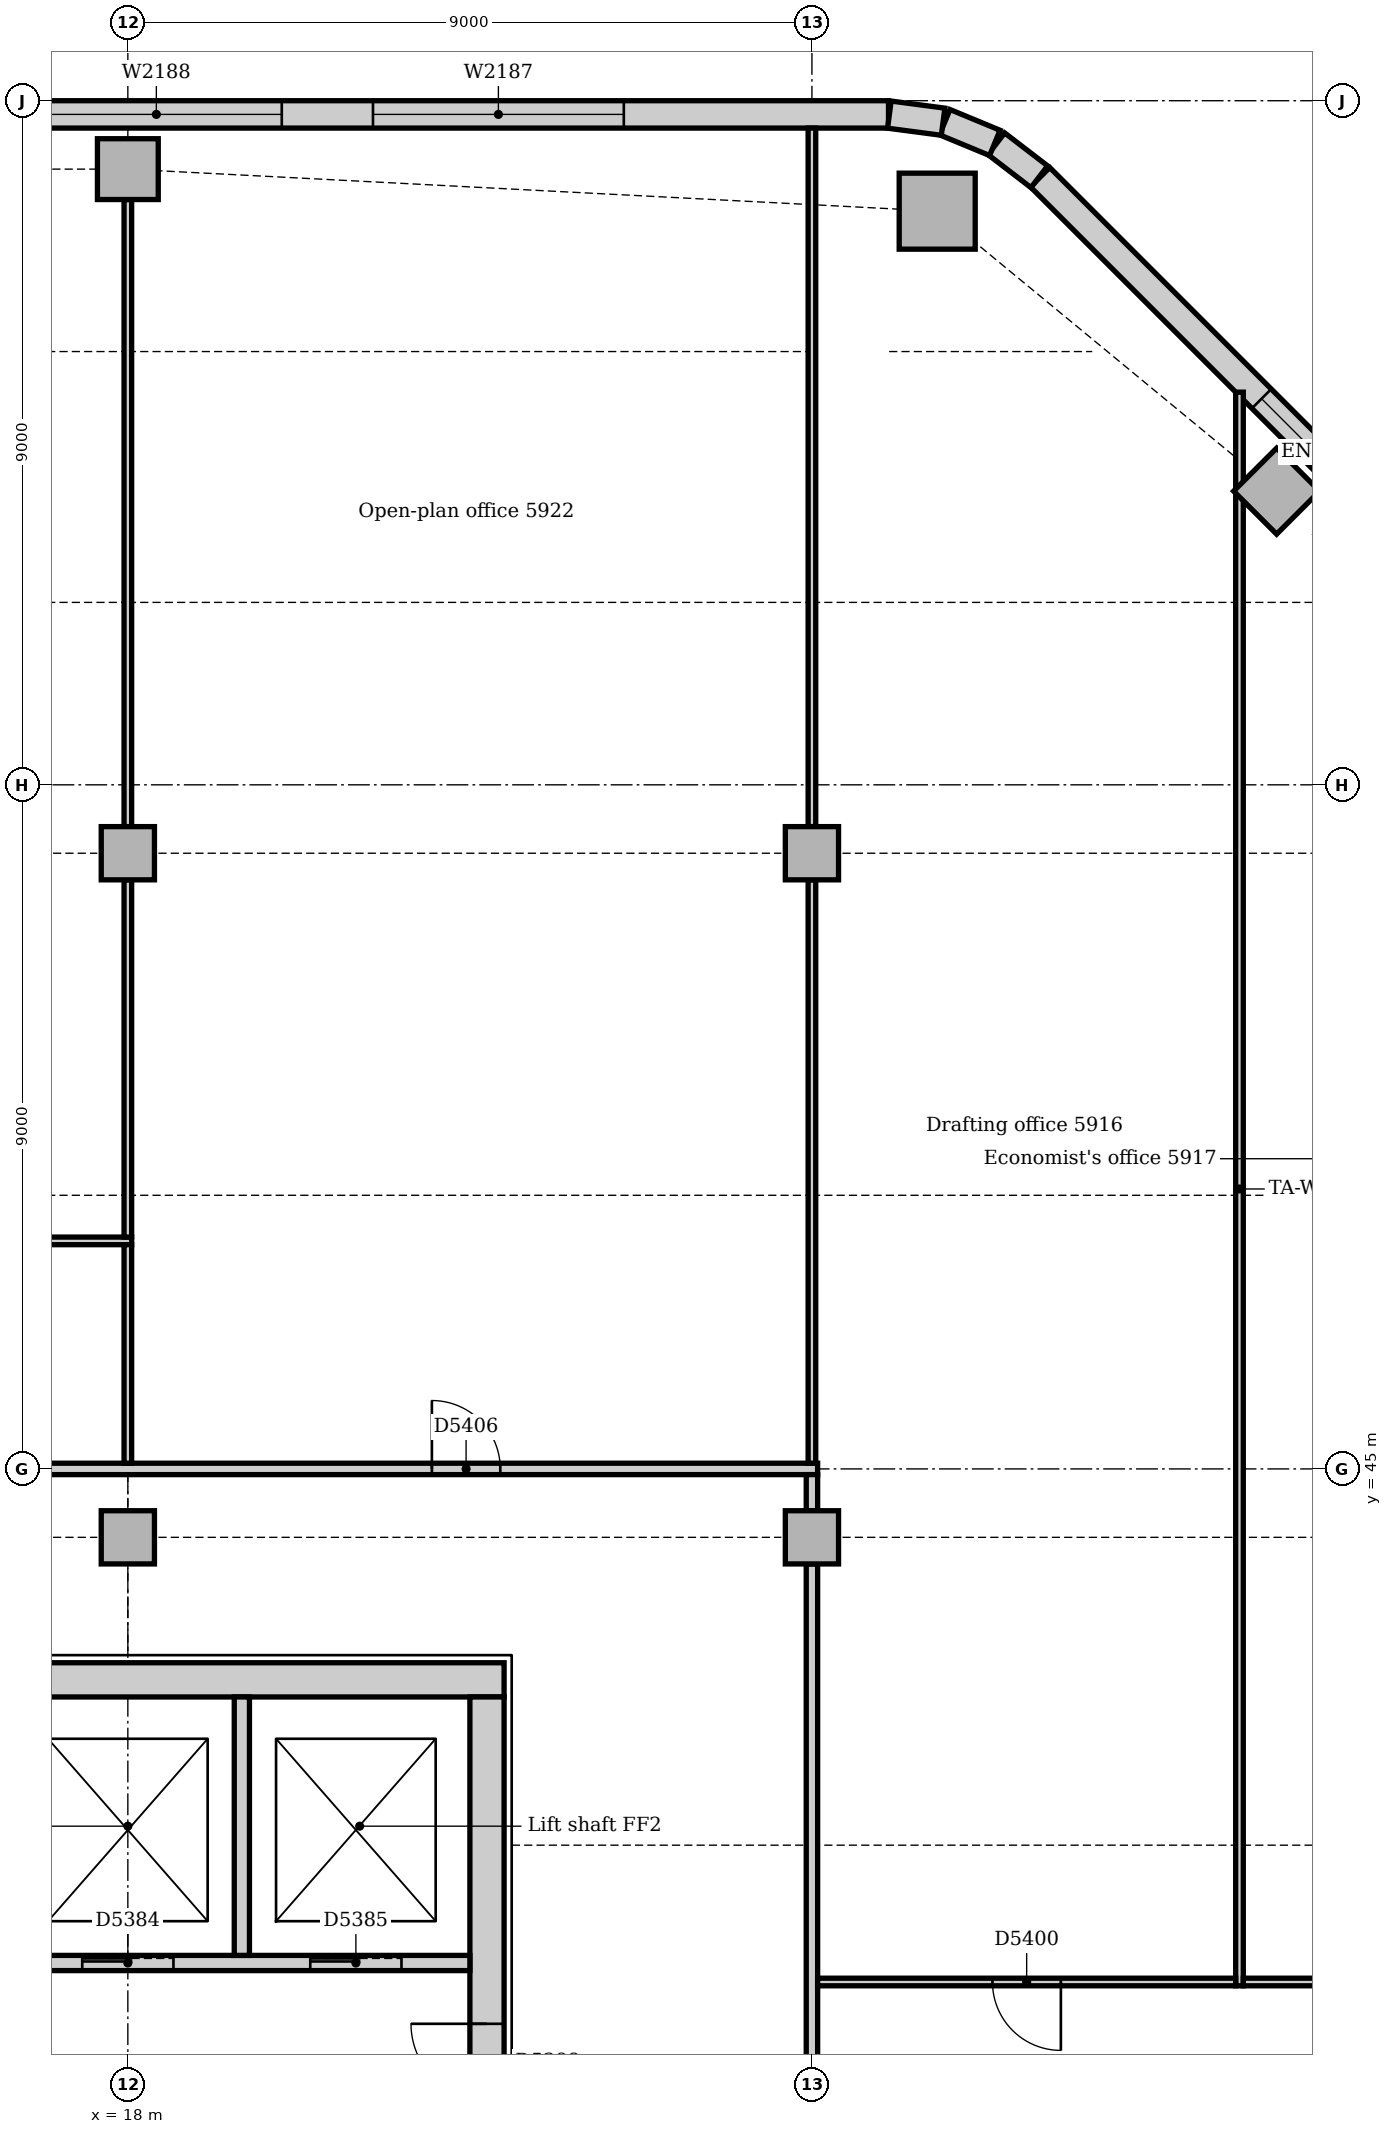
"""IFC4 building model, lengths in metres.
Left out: names, types, materials, properties, quantities, classifications, styles, units other than length and angle.
Written with IfcOpenShell. Run it as: python <this file> out.ifc"""

import sys

from ifc_helpers import new_model, si_unit, direction, frame, frame_2d, origin, origin_2d, place, context, subcontext, project, spatial, rectangle, extrude, element, fill, save


model = new_model("IFC4")
c1 = context("Model", 3, precision=1e-05, world=origin(), true_north=direction((0.0, 1.0)))
c2 = subcontext(c1, "Body", "Model", "MODEL_VIEW")
j1 = project(units=[si_unit("LENGTHUNIT", "METRE"), si_unit("PLANEANGLEUNIT", "RADIAN")], contexts=[c1])
p1 = place(None, origin())
s1 = spatial("IfcSite", under=j1, at=p1, CompositionType="ELEMENT")
p2 = place(p1, origin())
s2 = spatial("IfcBuilding", under=s1, at=p2, CompositionType="ELEMENT")
p3 = place(p2, frame((0.0, 0.0, 247.0)))
s3 = spatial("IfcBuildingStorey", under=s2, at=p3, CompositionType="ELEMENT", Elevation=247.0)
p4 = place(p3, frame((22.95, 42.225, 0.0), z_axis=(0.0, 0.0, 1.0), x_axis=(-1.0, 0.0, 0.0)))
e1 = element("IfcWall", 1, at=p4, inside=s3, PredefinedType="SOLIDWALL", context=c2, shape_type="SweptSolid", body=[
    extrude(rectangle(XDim=18.9, YDim=0.45, at=frame_2d((9.45, 0.0))), origin(), (0.0, 0.0, 1.0), 4.0),
])
p5 = place(p3, frame((22.725, 31.5, 0.0), z_axis=(0.0, 0.0, 1.0), x_axis=(0.0, 1.0, 0.0)))
e2 = element("IfcWall", 2, at=p5, inside=s3, PredefinedType="SOLIDWALL", context=c2, shape_type="SweptSolid", body=[
    extrude(rectangle(XDim=10.5, YDim=0.45, at=frame_2d((5.25, 0.0))), origin(), (0.0, 0.0, 1.0), 4.0),
])
p6 = place(p5, frame((3.15, 0.0, 0.0)))
e3 = element("IfcOpeningElement", 3, at=p6, cuts=e2, PredefinedType="OPENING", context=c2, shape_type="SweptSolid", body=[
    extrude(rectangle(XDim=1.0, YDim=2.1, at=frame_2d((0.5, 1.05))), frame((0.0, 0.235, 0.0), z_axis=(0.0, -1.0, 0.0), x_axis=(1.0, 0.0, 0.0)), (0.0, 0.0, 1.0), 0.47),
])
p7 = place(p5, frame((5.2, 0.0, 0.0)))
e4 = element("IfcOpeningElement", 4, at=p7, cuts=e2, PredefinedType="OPENING", context=c2, shape_type="SweptSolid", body=[
    extrude(rectangle(XDim=1.0, YDim=2.1, at=frame_2d((0.5, 1.05))), frame((0.0, 0.235, 0.0), z_axis=(0.0, -1.0, 0.0), x_axis=(1.0, 0.0, 0.0)), (0.0, 0.0, 1.0), 0.47),
])
p8 = place(p3, frame((28.648, 61.547, -0.15), z_axis=(0.0, 0.0, 1.0), x_axis=(1.0, 0.0, 0.0)))
e5 = element("IfcColumn", 5, at=p8, inside=s3, PredefinedType="COLUMN", context=c2, shape_type="SweptSolid", body=[
    extrude(rectangle(XDim=1.0, YDim=1.0, at=origin_2d()), origin(), (0.0, 0.0, 1.0), 4.0),
])
for number, where, z_axis, x_axis in (
    (6, (33.114, 57.864, -0.15), (0.0, 0.0, 1.0), (0.707, 0.707, 0.0)),
    (7, (18.0, 62.1, -0.15), (0.0, 0.0, 1.0), (1.0, 0.0, 0.0)),
):
    element("IfcColumn", number, at=place(p3, frame(where, z_axis=z_axis, x_axis=x_axis)), inside=s3, PredefinedType="COLUMN", context=c2, shape_type="SweptSolid", body=[
        extrude(rectangle(XDim=0.8, YDim=0.8, at=origin_2d()), origin(), (0.0, 0.0, 1.0), 4.0),
    ])
for number, where, z_axis, x_axis in (
    (8, (18.0, 44.1, 0.0), (0.0, 0.0, 1.0), (1.0, 0.0, 0.0)),
    (9, (18.0, 53.1, 0.0), (0.0, 0.0, 1.0), (1.0, 0.0, 0.0)),
    (10, (27.0, 44.1, 0.0), (0.0, 0.0, 1.0), (1.0, 0.0, 0.0)),
    (11, (27.0, 53.1, 0.0), (0.0, 0.0, 1.0), (1.0, 0.0, 0.0)),
):
    element("IfcColumn", number, at=place(p3, frame(where, z_axis=z_axis, x_axis=x_axis)), inside=s3, PredefinedType="COLUMN", context=c2, shape_type="SweptSolid", body=[
        extrude(rectangle(XDim=0.7, YDim=0.7, at=origin_2d()), origin(), (0.0, 0.0, 1.0), 3.85),
    ])
p9 = place(p3, frame((37.244, 54.751, 0.0), z_axis=(0.0, 0.0, 1.0), x_axis=(-0.707106781187, 0.707106781187, 0.0)))
e12 = element("IfcWall", 12, at=p9, inside=s3, PredefinedType="STANDARD", context=c2, shape_type="SweptSolid", body=[
    extrude(rectangle(XDim=10.243, YDim=0.36, at=frame_2d((5.121, 0.0))), origin(), (0.0, 0.0, 1.0), 3.85),
])
p10 = place(p9, frame((2.821, 0.0, 0.9)))
e13 = element("IfcOpeningElement", 13, at=p10, cuts=e12, PredefinedType="OPENING", context=c2, shape_type="SweptSolid", body=[
    extrude(rectangle(XDim=3.3, YDim=1.6, at=frame_2d((1.65, 0.8))), frame((0.0, 0.19, 0.0), z_axis=(0.0, -1.0, 0.0), x_axis=(1.0, 0.0, 0.0)), (0.0, 0.0, 1.0), 0.38),
])
p11 = place(p3, frame((28.007, 62.82, 0.0), z_axis=(0.0, 0.0, 1.0), x_axis=(-1.0, 0.0, 0.0)))
e14 = element("IfcWall", 14, at=p11, inside=s3, PredefinedType="STANDARD", context=c2, shape_type="SweptSolid", body=[
    extrude(rectangle(XDim=23.765, YDim=0.36, at=frame_2d((11.882, 0.0))), origin(), (0.0, 0.0, 1.0), 3.85),
])
p12 = place(p11, frame((3.482, 0.0, 0.9)))
e15 = element("IfcOpeningElement", 15, at=p12, cuts=e14, PredefinedType="OPENING", context=c2, shape_type="SweptSolid", body=[
    extrude(rectangle(XDim=3.3, YDim=1.6, at=frame_2d((1.65, 0.8))), frame((0.0, 0.19, 0.0), z_axis=(0.0, -1.0, 0.0), x_axis=(1.0, 0.0, 0.0)), (0.0, 0.0, 1.0), 0.38),
])
p13 = place(p11, frame((7.982, 0.0, 0.9)))
e16 = element("IfcOpeningElement", 16, at=p13, cuts=e14, PredefinedType="OPENING", context=c2, shape_type="SweptSolid", body=[
    extrude(rectangle(XDim=3.3, YDim=1.6, at=frame_2d((1.65, 0.8))), frame((0.0, 0.19, 0.0), z_axis=(0.0, -1.0, 0.0), x_axis=(1.0, 0.0, 0.0)), (0.0, 0.0, 1.0), 0.38),
])
p14 = place(p11, frame((12.482, 0.0, 0.9)))
e17 = element("IfcOpeningElement", 17, at=p14, cuts=e14, PredefinedType="OPENING", context=c2, shape_type="SweptSolid", body=[
    extrude(rectangle(XDim=3.3, YDim=1.6, at=frame_2d((1.65, 0.8))), frame((0.0, 0.19, 0.0), z_axis=(0.0, -1.0, 0.0), x_axis=(1.0, 0.0, 0.0)), (0.0, 0.0, 1.0), 0.38),
])
p15 = place(p11, frame((16.982, 0.0, 0.9)))
e18 = element("IfcOpeningElement", 18, at=p15, cuts=e14, PredefinedType="OPENING", context=c2, shape_type="SweptSolid", body=[
    extrude(rectangle(XDim=3.3, YDim=1.6, at=frame_2d((1.65, 0.8))), frame((0.0, 0.19, 0.0), z_axis=(0.0, -1.0, 0.0), x_axis=(1.0, 0.0, 0.0)), (0.0, 0.0, 1.0), 0.38),
])
p16 = place(p3, frame((29.991, 62.0, 0.0), z_axis=(0.0, 0.0, 1.0), x_axis=(-0.793321924995, 0.608802368033, 0.0)))
e19 = element("IfcWall", 19, at=p16, inside=s3, PredefinedType="STANDARD", context=c2, shape_type="SweptSolid", body=[
    extrude(rectangle(XDim=0.713, YDim=0.36, at=frame_2d((0.357, 0.0))), origin(), (0.0, 0.0, 1.0), 3.85),
])
for number, where, z_axis, x_axis in (
    (20, (29.406, 62.445, 0.0), (0.0, 0.0, 1.0), (-0.924, 0.383, 0.0)),
    (21, (28.726, 62.724, 0.0), (0.0, 0.0, 1.0), (-0.991, 0.131, 0.0)),
):
    element("IfcWall", number, at=place(p3, frame(where, z_axis=z_axis, x_axis=x_axis)), inside=s3, PredefinedType="STANDARD", context=c2, shape_type="SweptSolid", body=[
        extrude(rectangle(XDim=0.713, YDim=0.36, at=frame_2d((0.356, 0.0))), origin(), (0.0, 0.0, 1.0), 3.85),
    ])
p17 = place(p3, frame((16.4, 38.5, 0.0), z_axis=(0.0, 0.0, 1.0), x_axis=(1.0, 0.0, 0.0)))
e22 = element("IfcWall", 22, at=p17, inside=s3, PredefinedType="PARTITIONING", context=c2, shape_type="SweptSolid", body=[
    extrude(rectangle(XDim=6.1, YDim=0.2, at=frame_2d((3.05, 0.0))), origin(), (0.0, 0.0, 1.0), 3.85),
])
p18 = place(p17, frame((1.0, 0.0, 0.0)))
e23 = element("IfcOpeningElement", 23, at=p18, cuts=e22, PredefinedType="OPENING", context=c2, shape_type="SweptSolid", body=[
    extrude(rectangle(XDim=1.2, YDim=2.1, at=frame_2d((0.6, 1.05))), frame((0.0, 0.11, 0.0), z_axis=(0.0, -1.0, 0.0), x_axis=(1.0, 0.0, 0.0)), (0.0, 0.0, 1.0), 0.22),
])
p19 = place(p17, frame((4.0, 0.0, 0.0)))
e24 = element("IfcOpeningElement", 24, at=p19, cuts=e22, PredefinedType="OPENING", context=c2, shape_type="SweptSolid", body=[
    extrude(rectangle(XDim=1.2, YDim=2.1, at=frame_2d((0.6, 1.05))), frame((0.0, 0.11, 0.0), z_axis=(0.0, -1.0, 0.0), x_axis=(1.0, 0.0, 0.0)), (0.0, 0.0, 1.0), 0.22),
])
p20 = place(p3, frame((19.5, 38.6, 0.0), z_axis=(0.0, 0.0, 1.0), x_axis=(0.0, 1.0, 0.0)))
e25 = element("IfcWall", 25, at=p20, inside=s3, PredefinedType="PARTITIONING", context=c2, shape_type="SweptSolid", body=[
    extrude(rectangle(XDim=3.4, YDim=0.2, at=frame_2d((1.7, 0.0))), origin(), (0.0, 0.0, 1.0), 3.85),
])
p21 = place(p3, frame((0.36, 45.0, 0.0), z_axis=(0.0, 0.0, 1.0), x_axis=(1.0, 0.0, 0.0)))
e26 = element("IfcWall", 26, at=p21, inside=s3, PredefinedType="PARTITIONING", context=c2, shape_type="SweptSolid", body=[
    extrude(rectangle(XDim=26.715, YDim=0.15, at=frame_2d((13.357, 0.0))), origin(), (0.0, 0.0, 1.0), 3.85),
])
p22 = place(p21, frame((9.0, 0.0, 0.0)))
e27 = element("IfcOpeningElement", 27, at=p22, cuts=e26, PredefinedType="OPENING", context=c2, shape_type="SweptSolid", body=[
    extrude(rectangle(XDim=1.0, YDim=2.1, at=frame_2d((0.5, 1.05))), frame((0.0, 0.085, 0.0), z_axis=(0.0, -1.0, 0.0), x_axis=(1.0, 0.0, 0.0)), (0.0, 0.0, 1.0), 0.17),
])
p23 = place(p21, frame((21.64, 0.0, 0.0)))
e28 = element("IfcOpeningElement", 28, at=p23, cuts=e26, PredefinedType="OPENING", context=c2, shape_type="SweptSolid", body=[
    extrude(rectangle(XDim=0.9, YDim=2.1, at=frame_2d((0.45, 1.05))), frame((0.0, 0.085, 0.0), z_axis=(0.0, -1.0, 0.0), x_axis=(1.0, 0.0, 0.0)), (0.0, 0.0, 1.0), 0.17),
])
p24 = place(p3, frame((27.0, 36.35, 0.0), z_axis=(0.0, 0.0, 1.0), x_axis=(0.0, 1.0, 0.0)))
e29 = element("IfcWall", 29, at=p24, inside=s3, PredefinedType="PARTITIONING", context=c2, shape_type="SweptSolid", body=[
    extrude(rectangle(XDim=7.4, YDim=0.15, at=frame_2d((3.7, 0.0))), origin(), (0.0, 0.0, 1.0), 3.4),
])
p25 = place(p3, frame((27.0, 44.45, 0.0), z_axis=(0.0, 0.0, 1.0), x_axis=(0.0, 1.0, 0.0)))
e30 = element("IfcWall", 30, at=p25, inside=s3, PredefinedType="PARTITIONING", context=c2, shape_type="SweptSolid", body=[
    extrude(rectangle(XDim=0.475, YDim=0.15, at=frame_2d((0.237, 0.0))), origin(), (0.0, 0.0, 1.0), 3.85),
])
p26 = place(p3, frame((32.625, 38.2, 0.0), z_axis=(0.0, 0.0, 1.0), x_axis=(0.0, 1.0, 0.0)))
e31 = element("IfcWall", 31, at=p26, inside=s3, PredefinedType="PARTITIONING", context=c2, shape_type="SweptSolid", body=[
    extrude(rectangle(XDim=20.966, YDim=0.1, at=frame_2d((10.483, 0.0))), origin(), (0.0, 0.0, 1.0), 3.85),
])
p27 = place(p3, frame((0.36, 48.0, 0.0), z_axis=(0.0, 0.0, 1.0), x_axis=(1.0, 0.0, 0.0)))
e32 = element("IfcWall", 32, at=p27, inside=s3, PredefinedType="PARTITIONING", context=c2, shape_type="SweptSolid", body=[
    extrude(rectangle(XDim=17.69, YDim=0.1, at=frame_2d((8.845, 0.0))), origin(), (0.0, 0.0, 1.0), 3.85),
])
p28 = place(p27, frame((8.4, 0.0, 0.0)))
e33 = element("IfcOpeningElement", 33, at=p28, cuts=e32, PredefinedType="OPENING", context=c2, shape_type="SweptSolid", body=[
    extrude(rectangle(XDim=0.9, YDim=2.1, at=frame_2d((0.45, 1.05))), frame((0.0, 0.06, 0.0), z_axis=(0.0, -1.0, 0.0), x_axis=(1.0, 0.0, 0.0)), (0.0, 0.0, 1.0), 0.12),
])
p29 = place(p3, frame((18.0, 45.075, 0.0), z_axis=(0.0, 0.0, 1.0), x_axis=(0.0, 1.0, 0.0)))
e34 = element("IfcWall", 34, at=p29, inside=s3, PredefinedType="PARTITIONING", context=c2, shape_type="SweptSolid", body=[
    extrude(rectangle(XDim=2.875, YDim=0.1, at=frame_2d((1.438, 0.0))), origin(), (0.0, 0.0, 1.0), 3.4),
])
p30 = place(p3, frame((18.0, 48.05, 0.0), z_axis=(0.0, 0.0, 1.0), x_axis=(0.0, 1.0, 0.0)))
e35 = element("IfcWall", 35, at=p30, inside=s3, PredefinedType="PARTITIONING", context=c2, shape_type="SweptSolid", body=[
    extrude(rectangle(XDim=4.7, YDim=0.1, at=frame_2d((2.35, 0.0))), origin(), (0.0, 0.0, 1.0), 3.4),
])
p31 = place(p3, frame((18.0, 53.45, 0.0), z_axis=(0.0, 0.0, 1.0), x_axis=(0.0, 1.0, 0.0)))
e36 = element("IfcWall", 36, at=p31, inside=s3, PredefinedType="PARTITIONING", context=c2, shape_type="SweptSolid", body=[
    extrude(rectangle(XDim=8.25, YDim=0.1, at=frame_2d((4.125, 0.0))), origin(), (0.0, 0.0, 1.0), 3.4),
])
p32 = place(p3, frame((27.0, 45.075, 0.0), z_axis=(0.0, 0.0, 1.0), x_axis=(0.0, 1.0, 0.0)))
e37 = element("IfcWall", 37, at=p32, inside=s3, PredefinedType="PARTITIONING", context=c2, shape_type="SweptSolid", body=[
    extrude(rectangle(XDim=7.675, YDim=0.1, at=frame_2d((3.837, 0.0))), origin(), (0.0, 0.0, 1.0), 3.4),
])
p33 = place(p3, frame((27.0, 53.45, 0.0), z_axis=(0.0, 0.0, 1.0), x_axis=(0.0, 1.0, 0.0)))
e38 = element("IfcWall", 38, at=p33, inside=s3, PredefinedType="PARTITIONING", context=c2, shape_type="SweptSolid", body=[
    extrude(rectangle(XDim=9.19, YDim=0.1, at=frame_2d((4.595, 0.0))), origin(), (0.0, 0.0, 1.0), 3.4),
])
p34 = place(p3, frame((27.075, 38.25, 0.0), z_axis=(0.0, 0.0, 1.0), x_axis=(1.0, 0.0, 0.0)))
e39 = element("IfcWall", 39, at=p34, inside=s3, PredefinedType="PARTITIONING", context=c2, shape_type="SweptSolid", body=[
    extrude(rectangle(XDim=5.5, YDim=0.1, at=frame_2d((2.75, 0.0))), origin(), (0.0, 0.0, 1.0), 3.85),
])
p35 = place(p34, frame((2.3, 0.0, 0.0)))
e40 = element("IfcOpeningElement", 40, at=p35, cuts=e39, PredefinedType="OPENING", context=c2, shape_type="SweptSolid", body=[
    extrude(rectangle(XDim=0.9, YDim=2.1, at=frame_2d((0.45, 1.05))), frame((0.0, 0.06, 0.0), z_axis=(0.0, -1.0, 0.0), x_axis=(1.0, 0.0, 0.0)), (0.0, 0.0, 1.0), 0.12),
])
p36 = place(p3, frame((32.675, 38.25, 0.0), z_axis=(0.0, 0.0, 1.0), x_axis=(1.0, 0.0, 0.0)))
e41 = element("IfcWall", 41, at=p36, inside=s3, PredefinedType="PARTITIONING", context=c2, shape_type="SweptSolid", body=[
    extrude(rectangle(XDim=5.215, YDim=0.1, at=frame_2d((2.607, 0.0))), origin(), (0.0, 0.0, 1.0), 3.85),
])
p37 = place(p36, frame((2.15, 0.0, 0.0)))
e42 = element("IfcOpeningElement", 42, at=p37, cuts=e41, PredefinedType="OPENING", context=c2, shape_type="SweptSolid", body=[
    extrude(rectangle(XDim=0.9, YDim=2.1, at=frame_2d((0.45, 1.05))), frame((0.0, 0.06, 0.0), z_axis=(0.0, -1.0, 0.0), x_axis=(1.0, 0.0, 0.0)), (0.0, 0.0, 1.0), 0.12),
])
p38 = place(p10, origin())
e43 = element("IfcWindow", 43, at=p38, inside=s3, PartitioningType="SINGLE_PANEL", PredefinedType="WINDOW", context=c2, shape_type="SweptSolid", body=[
    extrude(rectangle(XDim=3.3, YDim=1.6, at=frame_2d((1.65, 0.8))), frame((0.0, 0.13, 0.0), z_axis=(0.0, -1.0, 0.0), x_axis=(1.0, 0.0, 0.0)), (0.0, 0.0, 1.0), 0.06),
])
fill(e13, e43)
p39 = place(p12, origin())
e44 = element("IfcWindow", 44, at=p39, inside=s3, PartitioningType="SINGLE_PANEL", PredefinedType="WINDOW", context=c2, shape_type="SweptSolid", body=[
    extrude(rectangle(XDim=3.3, YDim=1.6, at=frame_2d((1.65, 0.8))), frame((0.0, 0.13, 0.0), z_axis=(0.0, -1.0, 0.0), x_axis=(1.0, 0.0, 0.0)), (0.0, 0.0, 1.0), 0.06),
])
fill(e15, e44)
p40 = place(p13, origin())
e45 = element("IfcWindow", 45, at=p40, inside=s3, PartitioningType="SINGLE_PANEL", PredefinedType="WINDOW", context=c2, shape_type="SweptSolid", body=[
    extrude(rectangle(XDim=3.3, YDim=1.6, at=frame_2d((1.65, 0.8))), frame((0.0, 0.13, 0.0), z_axis=(0.0, -1.0, 0.0), x_axis=(1.0, 0.0, 0.0)), (0.0, 0.0, 1.0), 0.06),
])
fill(e16, e45)
p41 = place(p18, origin())
e46 = element("IfcDoor", 46, at=p41, inside=s3, OperationType="SLIDING_TO_LEFT", PredefinedType="DOOR", context=c2, shape_type="SweptSolid", body=[
    extrude(rectangle(XDim=1.2, YDim=2.1, at=frame_2d((0.6, 1.05))), frame((0.0, 0.025, 0.0), z_axis=(0.0, -1.0, 0.0), x_axis=(1.0, 0.0, 0.0)), (0.0, 0.0, 1.0), 0.05),
])
fill(e23, e46)
p42 = place(p19, origin())
e47 = element("IfcDoor", 47, at=p42, inside=s3, OperationType="SLIDING_TO_LEFT", PredefinedType="DOOR", context=c2, shape_type="SweptSolid", body=[
    extrude(rectangle(XDim=1.2, YDim=2.1, at=frame_2d((0.6, 1.05))), frame((0.0, 0.025, 0.0), z_axis=(0.0, -1.0, 0.0), x_axis=(1.0, 0.0, 0.0)), (0.0, 0.0, 1.0), 0.05),
])
fill(e24, e47)
p43 = place(p7, origin())
e48 = element("IfcDoor", 48, at=p43, inside=s3, OperationType="SINGLE_SWING_RIGHT", PredefinedType="DOOR", context=c2, shape_type="SweptSolid", body=[
    extrude(rectangle(XDim=1.0, YDim=2.1, at=frame_2d((0.5, 1.05))), frame((0.0, 0.025, 0.0), z_axis=(0.0, -1.0, 0.0), x_axis=(1.0, 0.0, 0.0)), (0.0, 0.0, 1.0), 0.05),
])
fill(e4, e48)
p44 = place(p35, frame((0.9, 0.0, 0.0), z_axis=(0.0, 0.0, 1.0), x_axis=(-1.0, 0.0, 0.0)))
e49 = element("IfcDoor", 49, at=p44, inside=s3, OperationType="SINGLE_SWING_LEFT", PredefinedType="DOOR", context=c2, shape_type="SweptSolid", body=[
    extrude(rectangle(XDim=0.9, YDim=2.1, at=frame_2d((0.45, 1.05))), frame((0.0, 0.025, 0.0), z_axis=(0.0, -1.0, 0.0), x_axis=(1.0, 0.0, 0.0)), (0.0, 0.0, 1.0), 0.05),
])
fill(e40, e49)
p45 = place(p23, origin())
e50 = element("IfcDoor", 50, at=p45, inside=s3, OperationType="SINGLE_SWING_LEFT", PredefinedType="DOOR", context=c2, shape_type="SweptSolid", body=[
    extrude(rectangle(XDim=0.9, YDim=2.1, at=frame_2d((0.45, 1.05))), frame((0.0, 0.025, 0.0), z_axis=(0.0, -1.0, 0.0), x_axis=(1.0, 0.0, 0.0)), (0.0, 0.0, 1.0), 0.05),
])
fill(e28, e50)
save(model, sys.argv[1])
